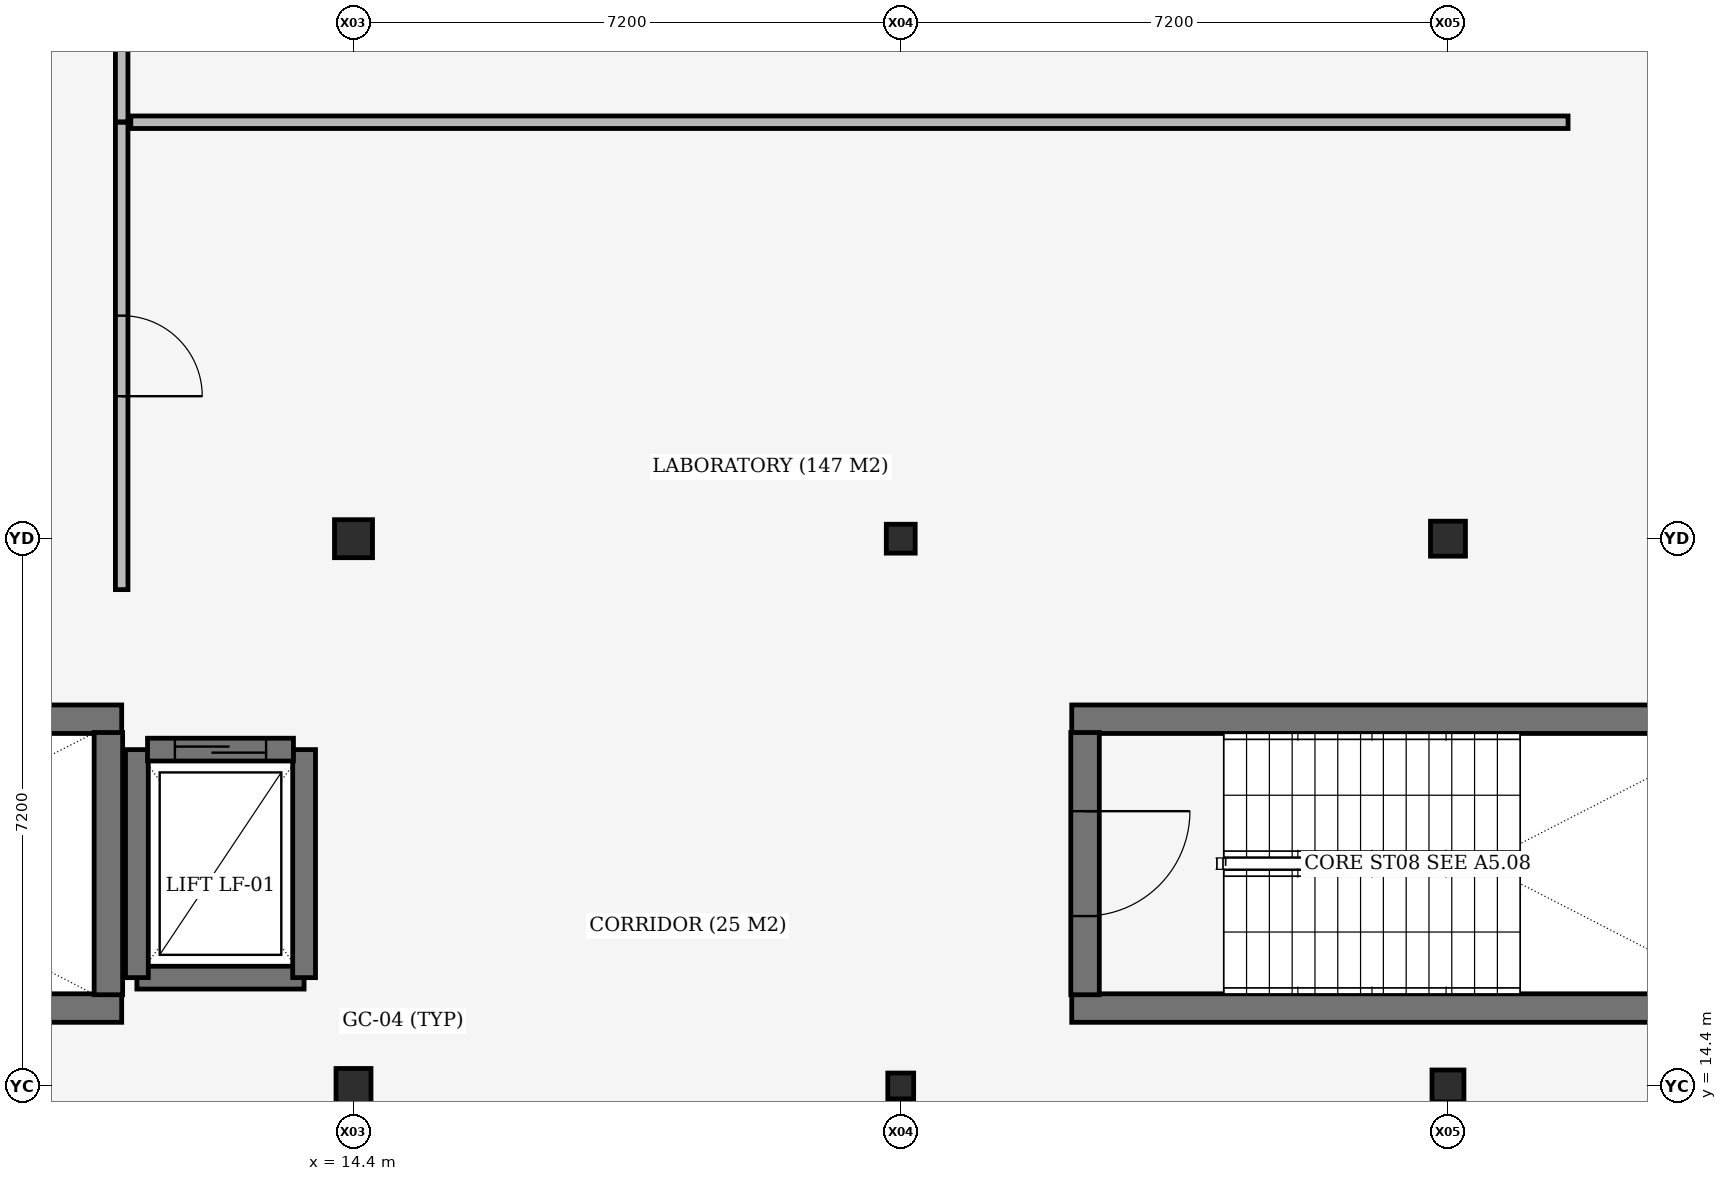
"""IFC4 building model, lengths in metres.
Left out: names, types, materials, properties, quantities, classifications, styles, units other than length and angle.
Written with IfcOpenShell. Run it as: python <this file> out.ifc"""

import sys

from ifc_helpers import new_model, si_unit, direction, frame, frame_2d, origin, origin_2d, place, context, subcontext, project, spatial, rectangle, extrude, element, fill, save


model = new_model("IFC4")
c1 = context("Model", 3, precision=1e-05, world=origin(), true_north=direction((0.0, 1.0)))
c2 = subcontext(c1, "Body", "Model", "MODEL_VIEW")
j1 = project(units=[si_unit("LENGTHUNIT", "METRE"), si_unit("PLANEANGLEUNIT", "RADIAN")], contexts=[c1])
p1 = place(None, origin())
s1 = spatial("IfcSite", under=j1, at=p1, CompositionType="ELEMENT")
p2 = place(p1, origin())
s2 = spatial("IfcBuilding", under=s1, at=p2, CompositionType="ELEMENT")
p3 = place(p2, frame((0.0, 0.0, 9.6)))
s3 = spatial("IfcBuildingStorey", under=s2, at=p3, CompositionType="ELEMENT", Elevation=9.6)
p4 = place(p3, frame((14.4, 14.4, 0.0), z_axis=(0.0, 0.0, 1.0), x_axis=(1.0, 0.0, 0.0)))
e1 = element("IfcColumn", 1, at=p4, inside=s3, PredefinedType="COLUMN", context=c2, shape_type="SweptSolid", body=[
    extrude(rectangle(XDim=0.46, YDim=0.46, at=origin_2d()), origin(), (0.0, 0.0, 1.0), 3.89),
])
p5 = place(p3, frame((14.4, 21.6, 0.0), z_axis=(0.0, 0.0, 1.0), x_axis=(1.0, 0.0, 0.0)))
e2 = element("IfcColumn", 2, at=p5, inside=s3, PredefinedType="COLUMN", context=c2, shape_type="SweptSolid", body=[
    extrude(rectangle(XDim=0.5, YDim=0.5, at=origin_2d()), origin(), (0.0, 0.0, 1.0), 3.89),
])
p6 = place(p3, frame((21.6, 14.4, 0.0), z_axis=(0.0, 0.0, 1.0), x_axis=(1.0, 0.0, 0.0)))
e3 = element("IfcColumn", 3, at=p6, inside=s3, PredefinedType="COLUMN", context=c2, shape_type="SweptSolid", body=[
    extrude(rectangle(XDim=0.34, YDim=0.34, at=origin_2d()), origin(), (0.0, 0.0, 1.0), 3.89),
])
p7 = place(p3, frame((21.6, 21.6, 0.0), z_axis=(0.0, 0.0, 1.0), x_axis=(1.0, 0.0, 0.0)))
e4 = element("IfcColumn", 4, at=p7, inside=s3, PredefinedType="COLUMN", context=c2, shape_type="SweptSolid", body=[
    extrude(rectangle(XDim=0.38, YDim=0.38, at=origin_2d()), origin(), (0.0, 0.0, 1.0), 3.89),
])
p8 = place(p3, frame((28.8, 14.4, 0.0), z_axis=(0.0, 0.0, 1.0), x_axis=(1.0, 0.0, 0.0)))
e5 = element("IfcColumn", 5, at=p8, inside=s3, PredefinedType="COLUMN", context=c2, shape_type="SweptSolid", body=[
    extrude(rectangle(XDim=0.42, YDim=0.42, at=origin_2d()), origin(), (0.0, 0.0, 1.0), 3.89),
])
p9 = place(p3, frame((28.8, 21.6, 0.0), z_axis=(0.0, 0.0, 1.0), x_axis=(1.0, 0.0, 0.0)))
e6 = element("IfcColumn", 6, at=p9, inside=s3, PredefinedType="COLUMN", context=c2, shape_type="SweptSolid", body=[
    extrude(rectangle(XDim=0.46, YDim=0.46, at=origin_2d()), origin(), (0.0, 0.0, 1.0), 3.89),
])
for number, where, z_axis, x_axis in (
    (7, (2.25, 15.425, 0.0), (0.0, 0.0, 1.0), (1.0, 0.0, 0.0)),
    (8, (11.35, 19.225, 0.0), (0.0, 0.0, 1.0), (-1.0, 0.0, 0.0)),
):
    element("IfcWall", number, at=place(p3, frame(where, z_axis=z_axis, x_axis=x_axis)), inside=s3, PredefinedType="SHEAR", context=c2, shape_type="SweptSolid", body=[
        extrude(rectangle(XDim=9.1, YDim=0.375, at=frame_2d((4.55, 0.0))), origin(), (0.0, 0.0, 1.0), 3.89),
    ])
p10 = place(p3, frame((11.175, 15.6, 0.0), z_axis=(0.0, 0.0, 1.0), x_axis=(0.0, 1.0, 0.0)))
e9 = element("IfcWall", 9, at=p10, inside=s3, PredefinedType="SHEAR", context=c2, shape_type="SweptSolid", body=[
    extrude(rectangle(XDim=3.45, YDim=0.375, at=frame_2d((1.725, 0.0))), origin(), (0.0, 0.0, 1.0), 3.89),
])
for number, where, z_axis, x_axis in (
    (10, (23.85, 15.425, 0.0), (0.0, 0.0, 1.0), (1.0, 0.0, 0.0)),
    (11, (32.95, 19.225, 0.0), (0.0, 0.0, 1.0), (-1.0, 0.0, 0.0)),
):
    element("IfcWall", number, at=place(p3, frame(where, z_axis=z_axis, x_axis=x_axis)), inside=s3, PredefinedType="SHEAR", context=c2, shape_type="SweptSolid", body=[
        extrude(rectangle(XDim=9.1, YDim=0.375, at=frame_2d((4.55, 0.0))), origin(), (0.0, 0.0, 1.0), 3.89),
    ])
p11 = place(p3, frame((11.55, 15.825, 0.0), z_axis=(0.0, 0.0, 1.0), x_axis=(1.0, 0.0, 0.0)))
e12 = element("IfcWall", 12, at=p11, inside=s3, PredefinedType="SHEAR", context=c2, shape_type="SweptSolid", body=[
    extrude(rectangle(XDim=2.2, YDim=0.3, at=frame_2d((1.1, 0.0))), origin(), (0.0, 0.0, 1.0), 3.89),
])
for number, where, z_axis, x_axis in (
    (13, (11.55, 18.825, 0.0), (0.0, 0.0, 1.0), (0.0, -1.0, 0.0)),
    (14, (13.75, 15.825, 0.0), (0.0, 0.0, 1.0), (0.0, 1.0, 0.0)),
):
    element("IfcWall", number, at=place(p3, frame(where, z_axis=z_axis, x_axis=x_axis)), inside=s3, PredefinedType="SHEAR", context=c2, shape_type="SweptSolid", body=[
        extrude(rectangle(XDim=3.0, YDim=0.3, at=frame_2d((1.5, 0.0))), origin(), (0.0, 0.0, 1.0), 3.89),
    ])
p12 = place(p3, frame((24.025, 19.05, 0.0), z_axis=(0.0, 0.0, 1.0), x_axis=(0.0, -1.0, 0.0)))
e15 = element("IfcWall", 15, at=p12, inside=s3, PredefinedType="SHEAR", context=c2, shape_type="SweptSolid", body=[
    extrude(rectangle(XDim=3.45, YDim=0.375, at=frame_2d((1.725, 0.0))), origin(), (0.0, 0.0, 1.0), 3.89),
])
p13 = place(p12, frame((1.035, 0.0, 0.0)))
e16 = element("IfcOpeningElement", 16, at=p13, cuts=e15, PredefinedType="OPENING", context=c2, shape_type="SweptSolid", body=[
    extrude(rectangle(XDim=1.38, YDim=2.2, at=frame_2d((0.69, 1.1))), frame((0.0, 0.198, 0.0), z_axis=(0.0, -1.0, 0.0), x_axis=(1.0, 0.0, 0.0)), (0.0, 0.0, 1.0), 0.395),
])
p14 = place(p3, frame((11.69, 18.825, 0.0), z_axis=(0.0, 0.0, 1.0), x_axis=(1.0, 0.0, 0.0)))
e17 = element("IfcWall", 17, at=p14, inside=s3, PredefinedType="SHEAR", context=c2, shape_type="SweptSolid", body=[
    extrude(rectangle(XDim=1.92, YDim=0.3, at=frame_2d((0.96, 0.0))), origin(), (0.0, 0.0, 1.0), 3.89),
])
p15 = place(p14, frame((0.36, 0.0, 0.0)))
e18 = element("IfcOpeningElement", 18, at=p15, cuts=e17, PredefinedType="OPENING", context=c2, shape_type="SweptSolid", body=[
    extrude(rectangle(XDim=1.2, YDim=2.1, at=frame_2d((0.6, 1.05))), frame((0.0, 0.16, 0.0), z_axis=(0.0, -1.0, 0.0), x_axis=(1.0, 0.0, 0.0)), (0.0, 0.0, 1.0), 0.32),
])
p16 = place(p3, frame((11.35, 20.93, 0.0), z_axis=(0.0, 0.0, 1.0), x_axis=(0.0, 1.0, 0.0)))
e19 = element("IfcWall", 19, at=p16, inside=s3, PredefinedType="PARTITIONING", context=c2, shape_type="SweptSolid", body=[
    extrude(rectangle(XDim=6.149, YDim=0.165, at=frame_2d((3.075, 0.0))), origin(), (0.0, 0.0, 1.0), 3.21),
])
p17 = place(p16, frame((2.544, 0.0, 0.0)))
e20 = element("IfcOpeningElement", 20, at=p17, cuts=e19, PredefinedType="OPENING", context=c2, shape_type="SweptSolid", body=[
    extrude(rectangle(XDim=1.06, YDim=2.2, at=frame_2d((0.53, 1.1))), frame((0.0, 0.093, 0.0), z_axis=(0.0, -1.0, 0.0), x_axis=(1.0, 0.0, 0.0)), (0.0, 0.0, 1.0), 0.185),
])
p18 = place(p3, frame((11.47, 27.079, 0.0), z_axis=(0.0, 0.0, 1.0), x_axis=(1.0, 0.0, 0.0)))
e21 = element("IfcWall", 21, at=p18, inside=s3, PredefinedType="PARTITIONING", context=c2, shape_type="SweptSolid", body=[
    extrude(rectangle(XDim=18.91, YDim=0.165, at=frame_2d((9.455, 0.0))), origin(), (0.0, 0.0, 1.0), 3.15),
])
p19 = place(p3, frame((11.35, 27.084, 0.0), z_axis=(0.0, 0.0, 1.0), x_axis=(0.0, 1.0, 0.0)))
e22 = element("IfcWall", 22, at=p19, inside=s3, PredefinedType="PARTITIONING", context=c2, shape_type="SweptSolid", body=[
    extrude(rectangle(XDim=24.469, YDim=0.165, at=frame_2d((12.234, 0.0))), origin(), (0.0, 0.0, 1.0), 3.15),
])
p20 = place(p19, frame((11.709, 0.0, 0.0)))
e23 = element("IfcOpeningElement", 23, at=p20, cuts=e22, PredefinedType="OPENING", context=c2, shape_type="SweptSolid", body=[
    extrude(rectangle(XDim=1.05, YDim=2.2, at=frame_2d((0.525, 1.1))), frame((0.0, 0.093, 0.0), z_axis=(0.0, -1.0, 0.0), x_axis=(1.0, 0.0, 0.0)), (0.0, 0.0, 1.0), 0.185),
])
p21 = place(p13, origin())
e24 = element("IfcDoor", 24, at=p21, inside=s3, OperationType="DOUBLE_DOOR_SINGLE_SWING", PredefinedType="DOOR", context=c2, shape_type="SweptSolid", body=[
    extrude(rectangle(XDim=1.38, YDim=2.2, at=frame_2d((0.69, 1.1))), frame((0.0, 0.025, 0.0), z_axis=(0.0, -1.0, 0.0), x_axis=(1.0, 0.0, 0.0)), (0.0, 0.0, 1.0), 0.05),
])
fill(e16, e24)
p22 = place(p15, origin())
e25 = element("IfcDoor", 25, at=p22, inside=s3, OperationType="SLIDING_TO_LEFT", PredefinedType="DOOR", context=c2, shape_type="SweptSolid", body=[
    extrude(rectangle(XDim=1.2, YDim=2.1, at=frame_2d((0.6, 1.05))), frame((0.0, 0.025, 0.0), z_axis=(0.0, -1.0, 0.0), x_axis=(1.0, 0.0, 0.0)), (0.0, 0.0, 1.0), 0.05),
])
fill(e18, e25)
p23 = place(p17, origin())
e26 = element("IfcDoor", 26, at=p23, inside=s3, OperationType="SINGLE_SWING_RIGHT", PredefinedType="DOOR", context=c2, shape_type="SweptSolid", body=[
    extrude(rectangle(XDim=1.06, YDim=2.2, at=frame_2d((0.53, 1.1))), frame((0.0, 0.025, 0.0), z_axis=(0.0, -1.0, 0.0), x_axis=(1.0, 0.0, 0.0)), (0.0, 0.0, 1.0), 0.05),
])
fill(e20, e26)
save(model, sys.argv[1])
